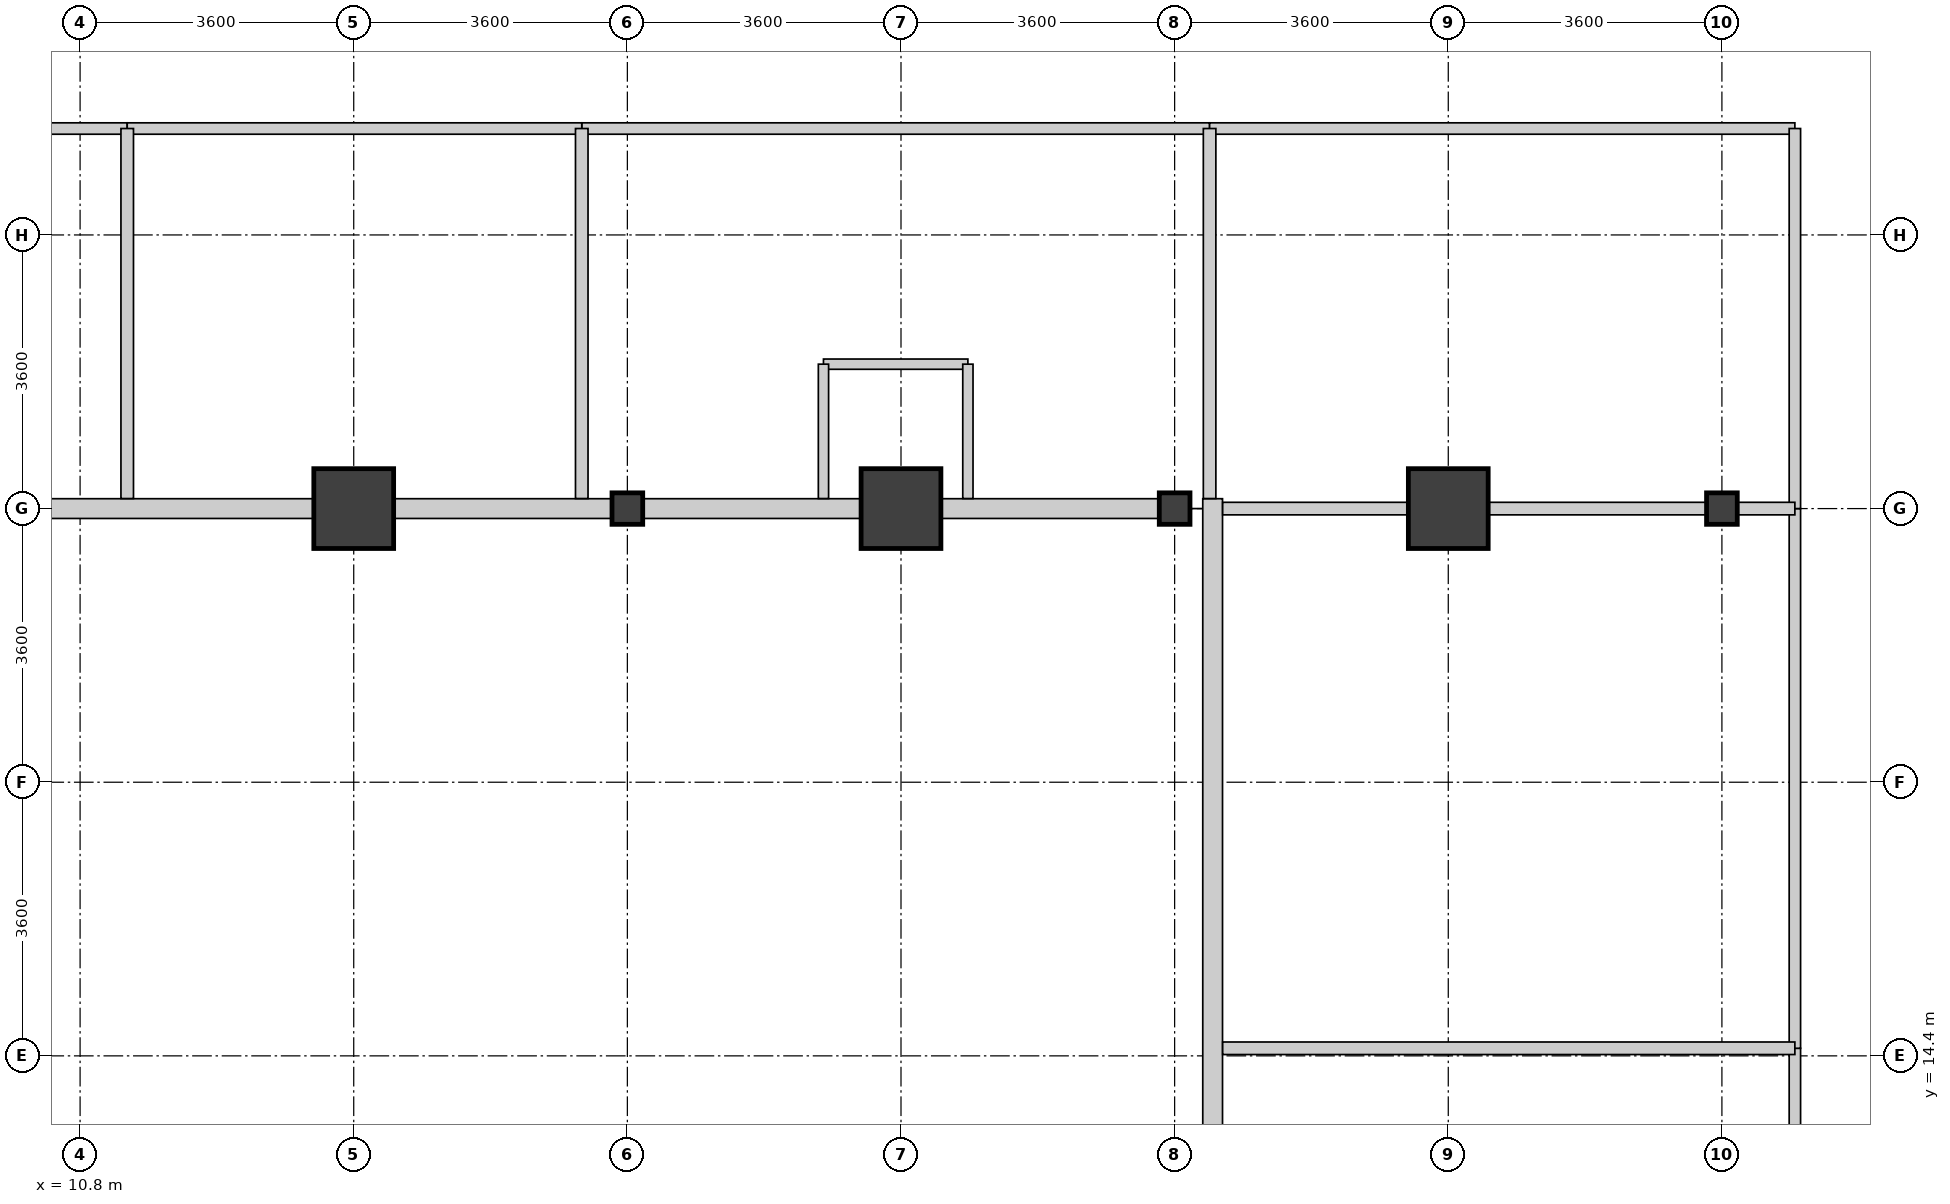
"""IFC4 building model, lengths in metres.
Left out: names, types, materials, properties, quantities, classifications, styles, units other than length and angle.
Written with IfcOpenShell. Run it as: python <this file> out.ifc"""

import sys

from ifc_helpers import new_model, si_unit, direction, frame, frame_2d, origin, origin_2d, place, context, subcontext, project, spatial, rectangle, i_section, extrude, source, transform, mapped, element, fill, save


model = new_model("IFC4")
c1 = context("Model", 3, precision=1e-05, world=origin(), true_north=direction((0.0, 1.0)))
c2 = subcontext(c1, "Body", "Model", "MODEL_VIEW")
j1 = project(units=[si_unit("LENGTHUNIT", "METRE"), si_unit("PLANEANGLEUNIT", "RADIAN")], contexts=[c1])
p1 = place(None, origin())
s1 = spatial("IfcSite", under=j1, at=p1, CompositionType="ELEMENT")
p2 = place(p1, origin())
s2 = spatial("IfcBuilding", under=s1, at=p2, CompositionType="ELEMENT")
p3 = place(p2, frame((0.0, 0.0, 135.6)))
s3 = spatial("IfcBuildingStorey", under=s2, at=p3, CompositionType="ELEMENT", Elevation=135.6)
m1 = source(origin(), c2, "Body", "SweptSolid", [
    extrude(rectangle(XDim=1.05, YDim=1.05, at=origin_2d()), origin(), (0.0, 0.0, 1.0), 4.6),
])
for number, where, z_axis, x_axis in (
    (1, (14.4, 21.6, 0.0), (0.0, 0.0, 1.0), (1.0, 0.0, 0.0)),
    (2, (21.6, 21.6, 0.0), (0.0, 0.0, 1.0), (1.0, 0.0, 0.0)),
    (3, (28.8, 21.6, 0.0), (0.0, 0.0, 1.0), (1.0, 0.0, 0.0)),
):
    element("IfcColumn", number, at=place(p3, frame(where, z_axis=z_axis, x_axis=x_axis)), inside=s3, PredefinedType="COLUMN", context=c2, shape_type="MappedRepresentation", body=[
        mapped(m1, transform((0.0, 0.0, 0.0), x_axis=(1.0, 0.0, 0.0), y_axis=(0.0, 1.0, 0.0), z_axis=(0.0, 0.0, 1.0), scale=1.0)),
    ])
m2 = source(origin(), c2, "Body", "SweptSolid", [
    extrude(i_section(OverallWidth=0.404, OverallDepth=0.414, WebThickness=0.021, FlangeThickness=0.028, FilletRadius=0.015, at=origin_2d()), origin(), (0.0, 0.0, 1.0), 4.6),
])
for number, where, z_axis, x_axis in (
    (4, (18.0, 21.6, 0.0), (0.0, 0.0, 1.0), (1.0, 0.0, 0.0)),
    (5, (25.2, 21.6, 0.0), (0.0, 0.0, 1.0), (1.0, 0.0, 0.0)),
    (6, (32.4, 21.6, 0.0), (0.0, 0.0, 1.0), (1.0, 0.0, 0.0)),
):
    element("IfcColumn", number, at=place(p3, frame(where, z_axis=z_axis, x_axis=x_axis)), inside=s3, PredefinedType="COLUMN", context=c2, shape_type="MappedRepresentation", body=[
        mapped(m2, transform((0.0, 0.0, 0.0), x_axis=(1.0, 0.0, 0.0), y_axis=(0.0, 1.0, 0.0), z_axis=(0.0, 0.0, 1.0), scale=1.0)),
    ])
p4 = place(p3, frame((13.874, 21.6, 0.0), z_axis=(0.0, 0.0, 1.0), x_axis=(-1.0, 0.0, 0.0)))
e7 = element("IfcWall", 7, at=p4, inside=s3, PredefinedType="STANDARD", context=c2, shape_type="SweptSolid", body=[
    extrude(rectangle(XDim=13.239, YDim=0.26, at=frame_2d((6.62, 0.0))), origin(), (0.0, 0.0, 1.0), 4.34),
])
p5 = place(p4, frame((3.615, 0.0, 0.85)))
e8 = element("IfcOpeningElement", 8, at=p5, cuts=e7, PredefinedType="OPENING", context=c2, shape_type="SweptSolid", body=[
    extrude(rectangle(XDim=2.7, YDim=2.05, at=frame_2d((1.35, 1.025))), frame((0.0, 0.14, 0.0), z_axis=(0.0, -1.0, 0.0), x_axis=(1.0, 0.0, 0.0)), (0.0, 0.0, 1.0), 0.28),
])
p6 = place(p4, frame((6.924, 0.0, 0.85)))
e9 = element("IfcOpeningElement", 9, at=p6, cuts=e7, PredefinedType="OPENING", context=c2, shape_type="SweptSolid", body=[
    extrude(rectangle(XDim=2.7, YDim=2.05, at=frame_2d((1.35, 1.025))), frame((0.0, 0.14, 0.0), z_axis=(0.0, -1.0, 0.0), x_axis=(1.0, 0.0, 0.0)), (0.0, 0.0, 1.0), 0.28),
])
p7 = place(p4, frame((10.234, 0.0, 0.85)))
e10 = element("IfcOpeningElement", 10, at=p7, cuts=e7, PredefinedType="OPENING", context=c2, shape_type="SweptSolid", body=[
    extrude(rectangle(XDim=2.7, YDim=2.05, at=frame_2d((1.35, 1.025))), frame((0.0, 0.14, 0.0), z_axis=(0.0, -1.0, 0.0), x_axis=(1.0, 0.0, 0.0)), (0.0, 0.0, 1.0), 0.28),
])
p8 = place(p3, frame((17.797, 21.6, 0.0), z_axis=(0.0, 0.0, 1.0), x_axis=(-1.0, 0.0, 0.0)))
e11 = element("IfcWall", 11, at=p8, inside=s3, PredefinedType="STANDARD", context=c2, shape_type="SweptSolid", body=[
    extrude(rectangle(XDim=2.871, YDim=0.26, at=frame_2d((1.436, 0.0))), origin(), (0.0, 0.0, 1.0), 3.89),
])
p9 = place(p8, frame((0.96, 0.0, 0.85)))
e12 = element("IfcOpeningElement", 12, at=p9, cuts=e11, PredefinedType="OPENING", context=c2, shape_type="SweptSolid", body=[
    extrude(rectangle(XDim=0.95, YDim=1.75, at=frame_2d((0.475, 0.875))), frame((0.0, 0.14, 0.0), z_axis=(0.0, -1.0, 0.0), x_axis=(1.0, 0.0, 0.0)), (0.0, 0.0, 1.0), 0.28),
])
p10 = place(p3, frame((21.074, 21.6, 0.0), z_axis=(0.0, 0.0, 1.0), x_axis=(-1.0, 0.0, 0.0)))
e13 = element("IfcWall", 13, at=p10, inside=s3, PredefinedType="STANDARD", context=c2, shape_type="SweptSolid", body=[
    extrude(rectangle(XDim=2.871, YDim=0.26, at=frame_2d((1.436, 0.0))), origin(), (0.0, 0.0, 1.0), 3.89),
])
p11 = place(p10, frame((0.96, 0.0, 0.85)))
e14 = element("IfcOpeningElement", 14, at=p11, cuts=e13, PredefinedType="OPENING", context=c2, shape_type="SweptSolid", body=[
    extrude(rectangle(XDim=0.95, YDim=1.75, at=frame_2d((0.475, 0.875))), frame((0.0, 0.14, 0.0), z_axis=(0.0, -1.0, 0.0), x_axis=(1.0, 0.0, 0.0)), (0.0, 0.0, 1.0), 0.28),
])
p12 = place(p3, frame((24.997, 21.6, 0.0), z_axis=(0.0, 0.0, 1.0), x_axis=(-1.0, 0.0, 0.0)))
e15 = element("IfcWall", 15, at=p12, inside=s3, PredefinedType="STANDARD", context=c2, shape_type="SweptSolid", body=[
    extrude(rectangle(XDim=2.871, YDim=0.26, at=frame_2d((1.436, 0.0))), origin(), (0.0, 0.0, 1.0), 3.89),
])
p13 = place(p12, frame((0.96, 0.0, 0.85)))
e16 = element("IfcOpeningElement", 16, at=p13, cuts=e15, PredefinedType="OPENING", context=c2, shape_type="SweptSolid", body=[
    extrude(rectangle(XDim=0.95, YDim=1.75, at=frame_2d((0.475, 0.875))), frame((0.0, 0.14, 0.0), z_axis=(0.0, -1.0, 0.0), x_axis=(1.0, 0.0, 0.0)), (0.0, 0.0, 1.0), 0.28),
])
p14 = place(p3, frame((25.7, 1.67, 0.0), z_axis=(0.0, 0.0, 1.0), x_axis=(0.0, 1.0, 0.0)))
e17 = element("IfcWall", 17, at=p14, inside=s3, PredefinedType="STANDARD", context=c2, shape_type="SweptSolid", body=[
    extrude(rectangle(XDim=20.06, YDim=0.26, at=frame_2d((10.03, 0.0))), origin(), (0.0, 0.0, 1.0), 4.34),
])
p15 = place(p14, frame((7.008, 0.0, 0.85)))
e18 = element("IfcOpeningElement", 18, at=p15, cuts=e17, PredefinedType="OPENING", context=c2, shape_type="SweptSolid", body=[
    extrude(rectangle(XDim=2.7, YDim=2.05, at=frame_2d((1.35, 1.025))), frame((0.0, 0.14, 0.0), z_axis=(0.0, -1.0, 0.0), x_axis=(1.0, 0.0, 0.0)), (0.0, 0.0, 1.0), 0.28),
])
p16 = place(p14, frame((13.695, 0.0, 0.85)))
e19 = element("IfcOpeningElement", 19, at=p16, cuts=e17, PredefinedType="OPENING", context=c2, shape_type="SweptSolid", body=[
    extrude(rectangle(XDim=2.7, YDim=2.05, at=frame_2d((1.35, 1.025))), frame((0.0, 0.14, 0.0), z_axis=(0.0, -1.0, 0.0), x_axis=(1.0, 0.0, 0.0)), (0.0, 0.0, 1.0), 0.28),
])
p17 = place(p3, frame((20.58, 23.5, 0.0), z_axis=(0.0, 0.0, 1.0), x_axis=(1.0, 0.0, 0.0)))
e20 = element("IfcWall", 20, at=p17, inside=s3, PredefinedType="PARTITIONING", context=c2, shape_type="SweptSolid", body=[
    extrude(rectangle(XDim=1.9, YDim=0.135, at=frame_2d((0.95, 0.0))), origin(), (0.0, 0.0, 1.0), 4.34),
])
p18 = place(p17, frame((0.525, 0.0, 0.0)))
e21 = element("IfcOpeningElement", 21, at=p18, cuts=e20, PredefinedType="OPENING", context=c2, shape_type="SweptSolid", body=[
    extrude(rectangle(XDim=0.85, YDim=2.04, at=frame_2d((0.425, 1.02))), frame((0.0, 0.078, 0.0), z_axis=(0.0, -1.0, 0.0), x_axis=(1.0, 0.0, 0.0)), (0.0, 0.0, 1.0), 0.155),
])
for number, where, z_axis, x_axis in (
    (22, (20.58, 21.732, 0.0), (0.0, 0.0, 1.0), (0.0, 1.0, 0.0)),
    (23, (22.48, 21.732, 0.0), (0.0, 0.0, 1.0), (0.0, 1.0, 0.0)),
):
    element("IfcWall", number, at=place(p3, frame(where, z_axis=z_axis, x_axis=x_axis)), inside=s3, PredefinedType="PARTITIONING", context=c2, shape_type="SweptSolid", body=[
        extrude(rectangle(XDim=1.768, YDim=0.135, at=frame_2d((0.884, 0.0))), origin(), (0.0, 0.0, 1.0), 4.34),
    ])
p19 = place(p3, frame((0.632, 26.6, 0.0), z_axis=(0.0, 0.0, 1.0), x_axis=(1.0, 0.0, 0.0)))
e24 = element("IfcWall", 24, at=p19, inside=s3, PredefinedType="PARTITIONING", context=c2, shape_type="SweptSolid", body=[
    extrude(rectangle(XDim=10.788, YDim=0.15, at=frame_2d((5.394, 0.0))), origin(), (0.0, 0.0, 1.0), 4.34),
])
p20 = place(p19, frame((4.744, 0.0, 0.0)))
e25 = element("IfcOpeningElement", 25, at=p20, cuts=e24, PredefinedType="OPENING", context=c2, shape_type="SweptSolid", body=[
    extrude(rectangle(XDim=1.3, YDim=2.12, at=frame_2d((0.65, 1.06))), frame((0.0, 0.085, 0.0), z_axis=(0.0, -1.0, 0.0), x_axis=(1.0, 0.0, 0.0)), (0.0, 0.0, 1.0), 0.17),
])
p21 = place(p3, frame((17.4, 26.6, 0.0), z_axis=(0.0, 0.0, 1.0), x_axis=(1.0, 0.0, 0.0)))
e26 = element("IfcWall", 26, at=p21, inside=s3, PredefinedType="PARTITIONING", context=c2, shape_type="SweptSolid", body=[
    extrude(rectangle(XDim=8.26, YDim=0.15, at=frame_2d((4.13, 0.0))), origin(), (0.0, 0.0, 1.0), 4.34),
])
p22 = place(p21, frame((3.655, 0.0, 0.0)))
e27 = element("IfcOpeningElement", 27, at=p22, cuts=e26, PredefinedType="OPENING", context=c2, shape_type="SweptSolid", body=[
    extrude(rectangle(XDim=0.95, YDim=2.1, at=frame_2d((0.475, 1.05))), frame((0.0, 0.085, 0.0), z_axis=(0.0, -1.0, 0.0), x_axis=(1.0, 0.0, 0.0)), (0.0, 0.0, 1.0), 0.17),
])
p23 = place(p3, frame((25.66, 26.6, 0.0), z_axis=(0.0, 0.0, 1.0), x_axis=(1.0, 0.0, 0.0)))
e28 = element("IfcWall", 28, at=p23, inside=s3, PredefinedType="PARTITIONING", context=c2, shape_type="SweptSolid", body=[
    extrude(rectangle(XDim=7.7, YDim=0.15, at=frame_2d((3.85, 0.0))), origin(), (0.0, 0.0, 1.0), 4.34),
])
p24 = place(p23, frame((3.2, 0.0, 0.0)))
e29 = element("IfcOpeningElement", 29, at=p24, cuts=e28, PredefinedType="OPENING", context=c2, shape_type="SweptSolid", body=[
    extrude(rectangle(XDim=1.3, YDim=2.12, at=frame_2d((0.65, 1.06))), frame((0.0, 0.085, 0.0), z_axis=(0.0, -1.0, 0.0), x_axis=(1.0, 0.0, 0.0)), (0.0, 0.0, 1.0), 0.17),
])
p25 = place(p3, frame((33.36, 7.24, 0.0), z_axis=(0.0, 0.0, 1.0), x_axis=(0.0, 1.0, 0.0)))
e30 = element("IfcWall", 30, at=p25, inside=s3, PredefinedType="PARTITIONING", context=c2, shape_type="SweptSolid", body=[
    extrude(rectangle(XDim=7.26, YDim=0.15, at=frame_2d((3.63, 0.0))), origin(), (0.0, 0.0, 1.0), 4.34),
])
p26 = place(p3, frame((33.36, 14.5, 0.0), z_axis=(0.0, 0.0, 1.0), x_axis=(0.0, 1.0, 0.0)))
e31 = element("IfcWall", 31, at=p26, inside=s3, PredefinedType="PARTITIONING", context=c2, shape_type="SweptSolid", body=[
    extrude(rectangle(XDim=7.1, YDim=0.15, at=frame_2d((3.55, 0.0))), origin(), (0.0, 0.0, 1.0), 4.34),
])
p27 = place(p26, frame((2.9, 0.0, 0.0)))
e32 = element("IfcOpeningElement", 32, at=p27, cuts=e31, PredefinedType="OPENING", context=c2, shape_type="SweptSolid", body=[
    extrude(rectangle(XDim=1.3, YDim=2.12, at=frame_2d((0.65, 1.06))), frame((0.0, 0.085, 0.0), z_axis=(0.0, -1.0, 0.0), x_axis=(1.0, 0.0, 0.0)), (0.0, 0.0, 1.0), 0.17),
])
p28 = place(p3, frame((11.42, 26.6, 0.0), z_axis=(0.0, 0.0, 1.0), x_axis=(1.0, 0.0, 0.0)))
e33 = element("IfcWall", 33, at=p28, inside=s3, PredefinedType="PARTITIONING", context=c2, shape_type="SweptSolid", body=[
    extrude(rectangle(XDim=5.98, YDim=0.15, at=frame_2d((2.99, 0.0))), origin(), (0.0, 0.0, 1.0), 4.34),
])
p29 = place(p28, frame((2.34, 0.0, 0.0)))
e34 = element("IfcOpeningElement", 34, at=p29, cuts=e33, PredefinedType="OPENING", context=c2, shape_type="SweptSolid", body=[
    extrude(rectangle(XDim=1.3, YDim=2.12, at=frame_2d((0.65, 1.06))), frame((0.0, 0.085, 0.0), z_axis=(0.0, -1.0, 0.0), x_axis=(1.0, 0.0, 0.0)), (0.0, 0.0, 1.0), 0.17),
])
p30 = place(p3, frame((33.36, 21.6, 0.0), z_axis=(0.0, 0.0, 1.0), x_axis=(0.0, 1.0, 0.0)))
e35 = element("IfcWall", 35, at=p30, inside=s3, PredefinedType="PARTITIONING", context=c2, shape_type="SweptSolid", body=[
    extrude(rectangle(XDim=5.0, YDim=0.15, at=frame_2d((2.5, 0.0))), origin(), (0.0, 0.0, 1.0), 4.34),
])
p31 = place(p3, frame((25.832, 14.5, 0.0), z_axis=(0.0, 0.0, 1.0), x_axis=(1.0, 0.0, 0.0)))
e36 = element("IfcWall", 36, at=p31, inside=s3, PredefinedType="PARTITIONING", context=c2, shape_type="SweptSolid", body=[
    extrude(rectangle(XDim=7.528, YDim=0.165, at=frame_2d((3.764, 0.0))), origin(), (0.0, 0.0, 1.0), 4.34),
])
p32 = place(p3, frame((25.832, 21.6, 0.0), z_axis=(0.0, 0.0, 1.0), x_axis=(1.0, 0.0, 0.0)))
e37 = element("IfcWall", 37, at=p32, inside=s3, PredefinedType="PARTITIONING", context=c2, shape_type="SweptSolid", body=[
    extrude(rectangle(XDim=7.528, YDim=0.165, at=frame_2d((3.764, 0.0))), origin(), (0.0, 0.0, 1.0), 3.89),
])
for number, where, z_axis, x_axis in (
    (38, (11.42, 21.732, 0.0), (0.0, 0.0, 1.0), (0.0, 1.0, 0.0)),
    (39, (17.4, 21.732, 0.0), (0.0, 0.0, 1.0), (0.0, 1.0, 0.0)),
    (40, (25.66, 21.732, 0.0), (0.0, 0.0, 1.0), (0.0, 1.0, 0.0)),
):
    element("IfcWall", number, at=place(p3, frame(where, z_axis=z_axis, x_axis=x_axis)), inside=s3, PredefinedType="PARTITIONING", context=c2, shape_type="SweptSolid", body=[
        extrude(rectangle(XDim=4.868, YDim=0.165, at=frame_2d((2.434, 0.0))), origin(), (0.0, 0.0, 1.0), 4.34),
    ])
p33 = place(p9, origin())
e41 = element("IfcWindow", 41, at=p33, inside=s3, PartitioningType="SINGLE_PANEL", PredefinedType="WINDOW", context=c2, shape_type="SweptSolid", body=[
    extrude(rectangle(XDim=0.95, YDim=1.75, at=frame_2d((0.475, 0.875))), frame((0.0, 0.03, 0.0), z_axis=(0.0, -1.0, 0.0), x_axis=(1.0, 0.0, 0.0)), (0.0, 0.0, 1.0), 0.06),
])
fill(e12, e41)
p34 = place(p11, origin())
e42 = element("IfcWindow", 42, at=p34, inside=s3, PartitioningType="SINGLE_PANEL", PredefinedType="WINDOW", context=c2, shape_type="SweptSolid", body=[
    extrude(rectangle(XDim=0.95, YDim=1.75, at=frame_2d((0.475, 0.875))), frame((0.0, 0.03, 0.0), z_axis=(0.0, -1.0, 0.0), x_axis=(1.0, 0.0, 0.0)), (0.0, 0.0, 1.0), 0.06),
])
fill(e14, e42)
p35 = place(p13, origin())
e43 = element("IfcWindow", 43, at=p35, inside=s3, PartitioningType="SINGLE_PANEL", PredefinedType="WINDOW", context=c2, shape_type="SweptSolid", body=[
    extrude(rectangle(XDim=0.95, YDim=1.75, at=frame_2d((0.475, 0.875))), frame((0.0, 0.03, 0.0), z_axis=(0.0, -1.0, 0.0), x_axis=(1.0, 0.0, 0.0)), (0.0, 0.0, 1.0), 0.06),
])
fill(e16, e43)
p36 = place(p16, origin())
e44 = element("IfcWindow", 44, at=p36, inside=s3, PartitioningType="SINGLE_PANEL", PredefinedType="WINDOW", context=c2, shape_type="SweptSolid", body=[
    extrude(rectangle(XDim=2.7, YDim=2.05, at=frame_2d((1.35, 1.025))), frame((0.0, 0.03, 0.0), z_axis=(0.0, -1.0, 0.0), x_axis=(1.0, 0.0, 0.0)), (0.0, 0.0, 1.0), 0.06),
])
fill(e19, e44)
p37 = place(p18, origin())
e45 = element("IfcDoor", 45, at=p37, inside=s3, OperationType="SINGLE_SWING_LEFT", PredefinedType="DOOR", context=c2, shape_type="SweptSolid", body=[
    extrude(rectangle(XDim=0.85, YDim=2.04, at=frame_2d((0.425, 1.02))), frame((0.0, 0.025, 0.0), z_axis=(0.0, -1.0, 0.0), x_axis=(1.0, 0.0, 0.0)), (0.0, 0.0, 1.0), 0.05),
])
fill(e21, e45)
p38 = place(p22, origin())
e46 = element("IfcDoor", 46, at=p38, inside=s3, OperationType="SINGLE_SWING_LEFT", PredefinedType="DOOR", context=c2, shape_type="SweptSolid", body=[
    extrude(rectangle(XDim=0.95, YDim=2.1, at=frame_2d((0.475, 1.05))), frame((0.0, 0.025, 0.0), z_axis=(0.0, -1.0, 0.0), x_axis=(1.0, 0.0, 0.0)), (0.0, 0.0, 1.0), 0.05),
])
fill(e27, e46)
p39 = place(p24, origin())
e47 = element("IfcDoor", 47, at=p39, inside=s3, OperationType="DOUBLE_DOOR_SINGLE_SWING", PredefinedType="DOOR", context=c2, shape_type="SweptSolid", body=[
    extrude(rectangle(XDim=1.3, YDim=2.12, at=frame_2d((0.65, 1.06))), frame((0.0, 0.025, 0.0), z_axis=(0.0, -1.0, 0.0), x_axis=(1.0, 0.0, 0.0)), (0.0, 0.0, 1.0), 0.05),
])
fill(e29, e47)
p40 = place(p27, origin())
e48 = element("IfcDoor", 48, at=p40, inside=s3, OperationType="DOUBLE_DOOR_SINGLE_SWING", PredefinedType="DOOR", context=c2, shape_type="SweptSolid", body=[
    extrude(rectangle(XDim=1.3, YDim=2.12, at=frame_2d((0.65, 1.06))), frame((0.0, 0.025, 0.0), z_axis=(0.0, -1.0, 0.0), x_axis=(1.0, 0.0, 0.0)), (0.0, 0.0, 1.0), 0.05),
])
fill(e32, e48)
p41 = place(p29, origin())
e49 = element("IfcDoor", 49, at=p41, inside=s3, OperationType="DOUBLE_DOOR_SINGLE_SWING", PredefinedType="DOOR", context=c2, shape_type="SweptSolid", body=[
    extrude(rectangle(XDim=1.3, YDim=2.12, at=frame_2d((0.65, 1.06))), frame((0.0, 0.025, 0.0), z_axis=(0.0, -1.0, 0.0), x_axis=(1.0, 0.0, 0.0)), (0.0, 0.0, 1.0), 0.05),
])
fill(e34, e49)
save(model, sys.argv[1])
